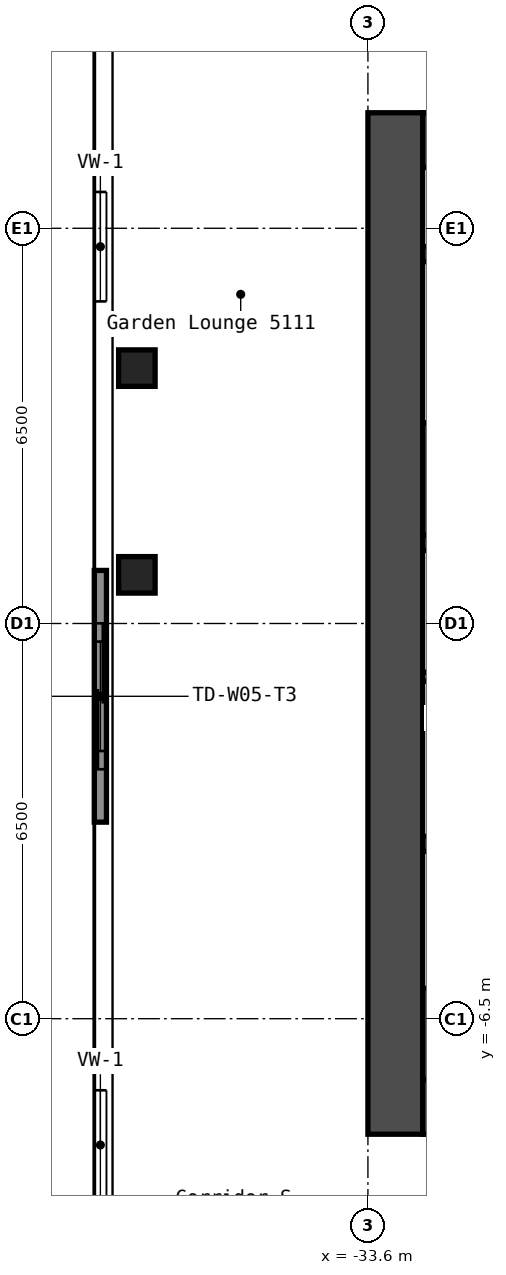
"""IFC4 building model, lengths in metres.
Left out: names, types, materials, properties, quantities, classifications, styles, units other than length and angle.
Written with IfcOpenShell. Run it as: python <this file> out.ifc"""

import sys

from ifc_helpers import new_model, si_unit, direction, frame, frame_2d, origin, origin_2d, place, context, subcontext, project, spatial, rectangle, hollow_rectangle, extrude, element, save


model = new_model("IFC4")
c1 = context("Model", 3, precision=1e-05, world=origin(), true_north=direction((0.0, 1.0)))
c2 = subcontext(c1, "Body", "Model", "MODEL_VIEW")
j1 = project(units=[si_unit("LENGTHUNIT", "METRE"), si_unit("PLANEANGLEUNIT", "RADIAN")], contexts=[c1])
p1 = place(None, origin())
s1 = spatial("IfcSite", under=j1, at=p1, CompositionType="ELEMENT")
p2 = place(p1, origin())
s2 = spatial("IfcBuilding", under=s1, at=p2, CompositionType="ELEMENT")
p3 = place(p2, frame((0.0, 0.0, 180.2)))
s3 = spatial("IfcBuildingStorey", under=s2, at=p3, CompositionType="ELEMENT", Elevation=180.2)
for number, where, z_axis, x_axis in (
    (1, (-37.4, 0.8, 0.0), (0.0, 0.0, 1.0), (1.0, 0.0, 0.0)),
    (2, (-37.4, 4.2, 0.0), (0.0, 0.0, 1.0), (1.0, 0.0, 0.0)),
):
    element("IfcColumn", number, at=place(p3, frame(where, z_axis=z_axis, x_axis=x_axis)), inside=s3, PredefinedType="COLUMN", context=c2, shape_type="SweptSolid", body=[
        extrude(hollow_rectangle(XDim=0.6, YDim=0.6, WallThickness=0.025, InnerFilletRadius=0.038, OuterFilletRadius=0.062, at=origin_2d()), origin(), (0.0, 0.0, 1.0), 5.95),
    ])
p4 = place(p3, frame((-33.15, -8.4, 0.0), z_axis=(0.0, 0.0, 1.0), x_axis=(0.0, 1.0, 0.0)))
e3 = element("IfcWall", 3, at=p4, inside=s3, PredefinedType="SHEAR", context=c2, shape_type="SweptSolid", body=[
    extrude(rectangle(XDim=16.8, YDim=0.9, at=frame_2d((8.4, 0.0))), origin(), (0.0, 0.0, 1.0), 5.95),
])
p5 = place(p3, frame((-32.7, 7.95, 0.0), z_axis=(0.0, 0.0, 1.0), x_axis=(1.0, 0.0, 0.0)))
e4 = element("IfcWall", 4, at=p5, inside=s3, PredefinedType="SHEAR", context=c2, shape_type="SweptSolid", body=[
    extrude(rectangle(XDim=15.0, YDim=0.9, at=frame_2d((7.5, 0.0))), origin(), (0.0, 0.0, 1.0), 5.95),
])
p6 = place(p5, frame((3.4, 0.0, 0.0)))
e5 = element("IfcOpeningElement", 5, at=p6, cuts=e4, PredefinedType="OPENING", context=c2, shape_type="SweptSolid", body=[
    extrude(rectangle(XDim=1.2, YDim=2.1, at=frame_2d((0.6, 1.05))), frame((0.0, 0.46, 0.0), z_axis=(0.0, -1.0, 0.0), x_axis=(1.0, 0.0, 0.0)), (0.0, 0.0, 1.0), 0.92),
])
p7 = place(p5, frame((0.75, 0.0, 0.0)))
e6 = element("IfcOpeningElement", 6, at=p7, cuts=e4, PredefinedType="OPENING", context=c2, shape_type="SweptSolid", body=[
    extrude(rectangle(XDim=0.9, YDim=2.1, at=frame_2d((0.45, 1.05))), frame((0.0, 0.46, 0.0), z_axis=(0.0, -1.0, 0.0), x_axis=(1.0, 0.0, 0.0)), (0.0, 0.0, 1.0), 0.92),
])
p8 = place(p3, frame((-32.7, -7.95, 0.0), z_axis=(0.0, 0.0, 1.0), x_axis=(1.0, 0.0, 0.0)))
e7 = element("IfcWall", 7, at=p8, inside=s3, PredefinedType="SHEAR", context=c2, shape_type="SweptSolid", body=[
    extrude(rectangle(XDim=15.0, YDim=0.9, at=frame_2d((7.5, 0.0))), origin(), (0.0, 0.0, 1.0), 5.95),
])
p9 = place(p8, frame((11.45, 0.0, 0.0)))
e8 = element("IfcOpeningElement", 8, at=p9, cuts=e7, PredefinedType="OPENING", context=c2, shape_type="SweptSolid", body=[
    extrude(rectangle(XDim=1.0, YDim=2.1, at=frame_2d((0.5, 1.05))), frame((0.0, 0.46, 0.0), z_axis=(0.0, -1.0, 0.0), x_axis=(1.0, 0.0, 0.0)), (0.0, 0.0, 1.0), 0.92),
])
p10 = place(p3, frame((-32.7, 1.325, 0.0), z_axis=(0.0, 0.0, 1.0), x_axis=(1.0, 0.0, 0.0)))
e9 = element("IfcWall", 9, at=p10, inside=s3, PredefinedType="SHEAR", context=c2, shape_type="SweptSolid", body=[
    extrude(rectangle(XDim=5.05, YDim=0.25, at=frame_2d((2.525, 0.0))), origin(), (0.0, 0.0, 1.0), 5.95),
])
p11 = place(p10, frame((3.3, 0.0, 0.0)))
e10 = element("IfcOpeningElement", 10, at=p11, cuts=e9, PredefinedType="OPENING", context=c2, shape_type="SweptSolid", body=[
    extrude(rectangle(XDim=1.2, YDim=2.1, at=frame_2d((0.6, 1.05))), frame((0.0, 0.135, 0.0), z_axis=(0.0, -1.0, 0.0), x_axis=(1.0, 0.0, 0.0)), (0.0, 0.0, 1.0), 0.27),
])
p12 = place(p3, frame((-32.7, 2.375, 0.0), z_axis=(0.0, 0.0, 1.0), x_axis=(1.0, 0.0, 0.0)))
e11 = element("IfcWall", 11, at=p12, inside=s3, PredefinedType="SHEAR", context=c2, shape_type="SweptSolid", body=[
    extrude(rectangle(XDim=2.4, YDim=1.85, at=frame_2d((1.2, 0.0))), origin(), (0.0, 0.0, 1.0), 5.95),
])
p13 = place(p3, frame((-32.7, 6.075, 0.0), z_axis=(0.0, 0.0, 1.0), x_axis=(1.0, 0.0, 0.0)))
e12 = element("IfcWall", 12, at=p13, inside=s3, PredefinedType="SHEAR", context=c2, shape_type="SweptSolid", body=[
    extrude(rectangle(XDim=2.4, YDim=0.25, at=frame_2d((1.2, 0.0))), origin(), (0.0, 0.0, 1.0), 5.95),
])
p14 = place(p3, frame((-32.7, -3.625, 0.0), z_axis=(0.0, 0.0, 1.0), x_axis=(1.0, 0.0, 0.0)))
e13 = element("IfcWall", 13, at=p14, inside=s3, PredefinedType="SHEAR", context=c2, shape_type="SweptSolid", body=[
    extrude(rectangle(XDim=4.55, YDim=0.25, at=frame_2d((2.275, 0.0))), origin(), (0.0, 0.0, 1.0), 5.95),
])
p15 = place(p14, frame((2.85, 0.0, 0.0)))
e14 = element("IfcOpeningElement", 14, at=p15, cuts=e13, PredefinedType="OPENING", context=c2, shape_type="SweptSolid", body=[
    extrude(rectangle(XDim=1.1, YDim=2.1, at=frame_2d((0.55, 1.05))), frame((0.0, 0.135, 0.0), z_axis=(0.0, -1.0, 0.0), x_axis=(1.0, 0.0, 0.0)), (0.0, 0.0, 1.0), 0.27),
])
p16 = place(p14, frame((0.6, 0.0, 0.0)))
e15 = element("IfcOpeningElement", 15, at=p16, cuts=e13, PredefinedType="OPENING", context=c2, shape_type="SweptSolid", body=[
    extrude(rectangle(XDim=1.1, YDim=2.1, at=frame_2d((0.55, 1.05))), frame((0.0, 0.135, 0.0), z_axis=(0.0, -1.0, 0.0), x_axis=(1.0, 0.0, 0.0)), (0.0, 0.0, 1.0), 0.27),
])
p17 = place(p3, frame((-32.7, -6.75, 0.0), z_axis=(0.0, 0.0, 1.0), x_axis=(1.0, 0.0, 0.0)))
e16 = element("IfcWall", 16, at=p17, inside=s3, PredefinedType="SHEAR", context=c2, shape_type="SweptSolid", body=[
    extrude(rectangle(XDim=4.55, YDim=1.5, at=frame_2d((2.275, 0.0))), origin(), (0.0, 0.0, 1.0), 5.95),
])
p18 = place(p3, frame((-32.7, -0.875, 0.0), z_axis=(0.0, 0.0, 1.0), x_axis=(1.0, 0.0, 0.0)))
e17 = element("IfcWall", 17, at=p18, inside=s3, PredefinedType="PARTITIONING", context=c2, shape_type="SweptSolid", body=[
    extrude(rectangle(XDim=2.3, YDim=0.15, at=frame_2d((1.15, 0.0))), origin(), (0.0, 0.0, 1.0), 5.95),
])
p19 = place(p3, frame((-38.0, 9.895, 4.45), z_axis=(0.0, 0.0, 1.0), x_axis=(0.0, -1.0, 0.0)))
p20 = place(p19, frame((2.797, 0.0, 0.25)))
p21 = place(p20, origin())
e18 = element("IfcWindow", 18, at=p21, inside=s3, PartitioningType="SINGLE_PANEL", PredefinedType="WINDOW", context=c2, shape_type="SweptSolid", body=[
    extrude(rectangle(XDim=1.8, YDim=0.9, at=frame_2d((0.9, 0.45))), frame((0.0, 0.03, 0.0), z_axis=(0.0, -1.0, 0.0), x_axis=(1.0, 0.0, 0.0)), (0.0, 0.0, 1.0), 0.06),
])
p22 = place(p3, frame((-38.0, 2.5, 4.45), z_axis=(0.0, 0.0, 1.0), x_axis=(0.0, -1.0, 0.0)))
p23 = place(p22, frame((2.797, 0.0, 0.25)))
p24 = place(p23, origin())
e19 = element("IfcWindow", 19, at=p24, inside=s3, PartitioningType="SINGLE_PANEL", PredefinedType="WINDOW", context=c2, shape_type="SweptSolid", body=[
    extrude(rectangle(XDim=1.8, YDim=0.9, at=frame_2d((0.9, 0.45))), frame((0.0, 0.03, 0.0), z_axis=(0.0, -1.0, 0.0), x_axis=(1.0, 0.0, 0.0)), (0.0, 0.0, 1.0), 0.06),
])
p25 = place(p3, frame((-38.0, -4.895, 4.45), z_axis=(0.0, 0.0, 1.0), x_axis=(0.0, -1.0, 0.0)))
p26 = place(p25, frame((2.782, 0.0, 0.25)))
p27 = place(p26, origin())
e20 = element("IfcWindow", 20, at=p27, inside=s3, PartitioningType="SINGLE_PANEL", PredefinedType="WINDOW", context=c2, shape_type="SweptSolid", body=[
    extrude(rectangle(XDim=1.8, YDim=0.9, at=frame_2d((0.9, 0.45))), frame((0.0, 0.03, 0.0), z_axis=(0.0, -1.0, 0.0), x_axis=(1.0, 0.0, 0.0)), (0.0, 0.0, 1.0), 0.06),
])
p28 = place(p3, frame((-38.0, 0.873, 0.0), z_axis=(0.0, 0.0, 1.0), x_axis=(0.0, -1.0, 0.0)))
p29 = place(p28, frame((0.87, 0.0, 0.0)))
p30 = place(p29, frame((2.4, 0.0, 0.0), z_axis=(0.0, 0.0, 1.0), x_axis=(-1.0, 0.0, 0.0)))
e21 = element("IfcDoor", 21, at=p30, inside=s3, OperationType="SLIDING_TO_LEFT", PredefinedType="DOOR", context=c2, shape_type="SweptSolid", body=[
    extrude(rectangle(XDim=2.4, YDim=2.2, at=frame_2d((1.2, 1.1))), frame((0.0, 0.025, 0.0), z_axis=(0.0, -1.0, 0.0), x_axis=(1.0, 0.0, 0.0)), (0.0, 0.0, 1.0), 0.05),
])
save(model, sys.argv[1])
